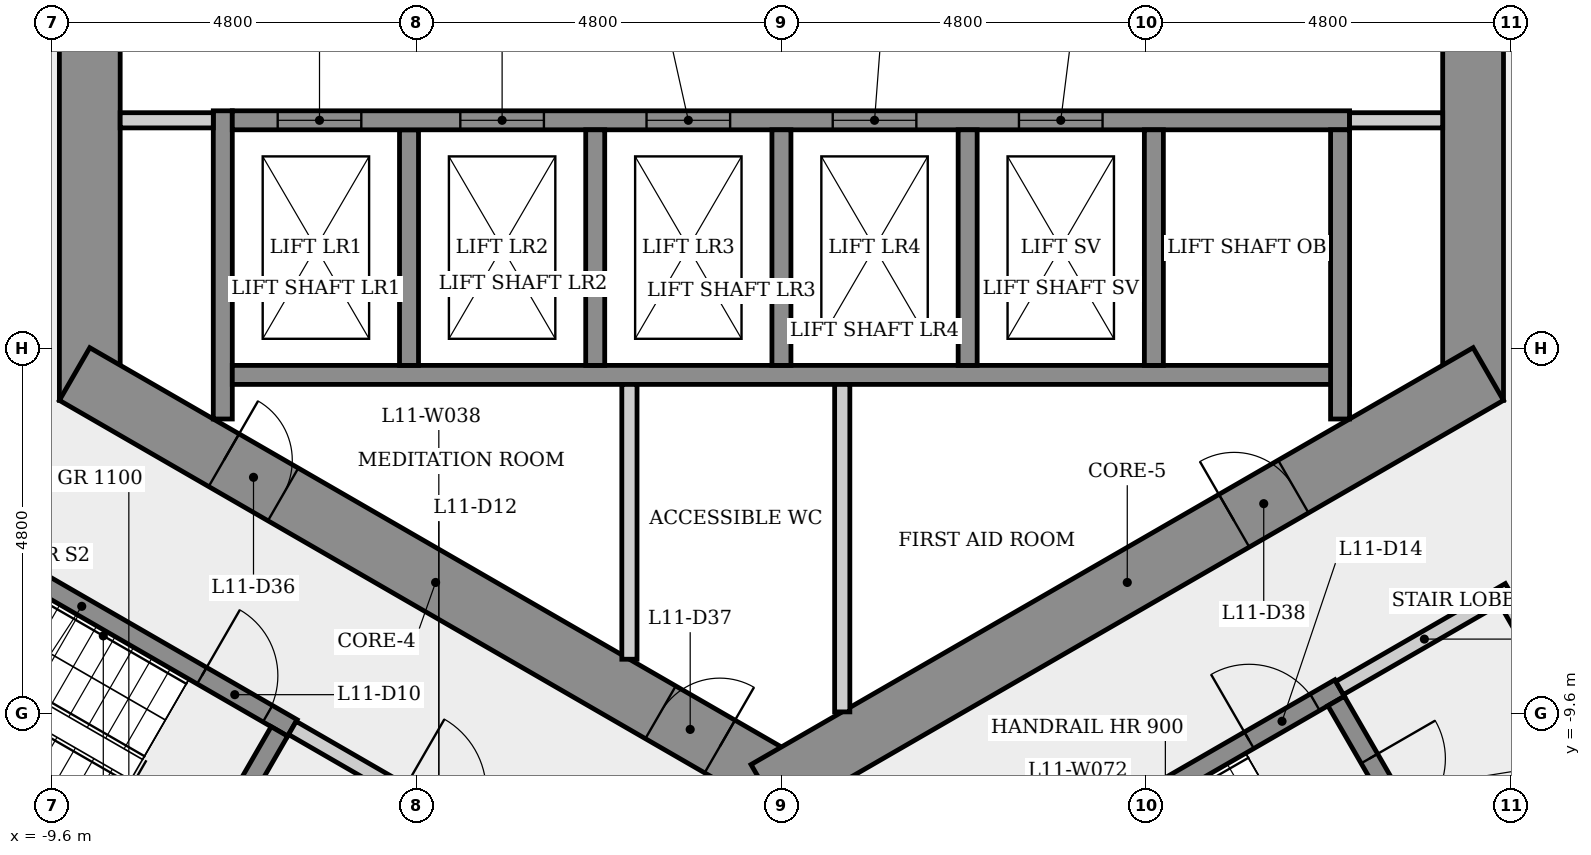
"""IFC4 building model, lengths in metres.
Left out: names, types, materials, properties, quantities, classifications, styles, units other than length and angle.
Written with IfcOpenShell. Run it as: python <this file> out.ifc"""

import sys

from ifc_helpers import new_model, si_unit, direction, frame, frame_2d, origin, place, context, subcontext, project, spatial, rectangle, extrude, element, fill, save


model = new_model("IFC4")
c1 = context("Model", 3, precision=1e-05, world=origin(), true_north=direction((0.0, 1.0)))
c2 = subcontext(c1, "Body", "Model", "MODEL_VIEW")
j1 = project(units=[si_unit("LENGTHUNIT", "METRE"), si_unit("PLANEANGLEUNIT", "RADIAN")], contexts=[c1])
p1 = place(None, origin())
s1 = spatial("IfcSite", under=j1, at=p1, CompositionType="ELEMENT")
p2 = place(p1, origin())
s2 = spatial("IfcBuilding", under=s1, at=p2, CompositionType="ELEMENT")
p3 = place(p2, frame((0.0, 0.0, 45.9)))
s3 = spatial("IfcBuildingStorey", under=s2, at=p3, CompositionType="ELEMENT", Elevation=45.9)
p4 = place(p3, frame((9.1, -5.485, 0.0), z_axis=(0.0, 0.0, 1.0), x_axis=(0.0, 1.0, 0.0)))
e1 = element("IfcWall", 1, at=p4, inside=s3, PredefinedType="SHEAR", context=c2, shape_type="SweptSolid", body=[
    extrude(rectangle(XDim=10.97, YDim=0.8, at=frame_2d((5.485, 0.0))), origin(), (0.0, 0.0, 1.0), 3.4),
])
p5 = place(p4, frame((4.685, 0.0, 0.0)))
e2 = element("IfcOpeningElement", 2, at=p5, cuts=e1, PredefinedType="OPENING", context=c2, shape_type="SweptSolid", body=[
    extrude(rectangle(XDim=1.6, YDim=2.1, at=frame_2d((0.8, 1.05))), frame((0.0, 0.41, 0.0), z_axis=(0.0, -1.0, 0.0), x_axis=(1.0, 0.0, 0.0)), (0.0, 0.0, 1.0), 0.82),
])
p6 = place(p3, frame((-9.1, 5.485, 0.0), z_axis=(0.0, 0.0, 1.0), x_axis=(0.0, -1.0, 0.0)))
e3 = element("IfcWall", 3, at=p6, inside=s3, PredefinedType="SHEAR", context=c2, shape_type="SweptSolid", body=[
    extrude(rectangle(XDim=10.97, YDim=0.8, at=frame_2d((5.485, 0.0))), origin(), (0.0, 0.0, 1.0), 3.4),
])
p7 = place(p6, frame((4.685, 0.0, 0.0)))
e4 = element("IfcOpeningElement", 4, at=p7, cuts=e3, PredefinedType="OPENING", context=c2, shape_type="SweptSolid", body=[
    extrude(rectangle(XDim=1.6, YDim=2.1, at=frame_2d((0.8, 1.05))), frame((0.0, 0.41, 0.0), z_axis=(0.0, -1.0, 0.0), x_axis=(1.0, 0.0, 0.0)), (0.0, 0.0, 1.0), 0.82),
])
p8 = place(p3, frame((-9.3, -5.138, 0.0), z_axis=(0.0, 0.0, 1.0), x_axis=(0.866023993627, -0.500002442456, 0.0)))
e5 = element("IfcWall", 5, at=p8, inside=s3, PredefinedType="SHEAR", context=c2, shape_type="SweptSolid", body=[
    extrude(rectangle(XDim=10.97, YDim=0.8, at=frame_2d((5.485, 0.0))), origin(), (0.0, 0.0, 1.0), 3.4),
])
p9 = place(p8, frame((2.268, 0.0, 0.0)))
e6 = element("IfcOpeningElement", 6, at=p9, cuts=e5, PredefinedType="OPENING", context=c2, shape_type="SweptSolid", body=[
    extrude(rectangle(XDim=0.9, YDim=2.1, at=frame_2d((0.45, 1.05))), frame((0.0, 0.41, 0.0), z_axis=(0.0, -1.0, 0.0), x_axis=(1.0, 0.0, 0.0)), (0.0, 0.0, 1.0), 0.82),
])
p10 = place(p8, frame((8.903, 0.0, 0.0)))
e7 = element("IfcOpeningElement", 7, at=p10, cuts=e5, PredefinedType="OPENING", context=c2, shape_type="SweptSolid", body=[
    extrude(rectangle(XDim=0.9, YDim=2.1, at=frame_2d((0.45, 1.05))), frame((0.0, 0.41, 0.0), z_axis=(0.0, -1.0, 0.0), x_axis=(1.0, 0.0, 0.0)), (0.0, 0.0, 1.0), 0.82),
])
p11 = place(p3, frame((-0.2, -10.623, 0.0), z_axis=(0.0, 0.0, 1.0), x_axis=(0.866023993627, 0.500002442456, 0.0)))
e8 = element("IfcWall", 8, at=p11, inside=s3, PredefinedType="SHEAR", context=c2, shape_type="SweptSolid", body=[
    extrude(rectangle(XDim=10.97, YDim=0.8, at=frame_2d((5.485, 0.0))), origin(), (0.0, 0.0, 1.0), 3.4),
])
p12 = place(p11, frame((7.108, 0.0, 0.0)))
e9 = element("IfcOpeningElement", 9, at=p12, cuts=e8, PredefinedType="OPENING", context=c2, shape_type="SweptSolid", body=[
    extrude(rectangle(XDim=0.9, YDim=2.1, at=frame_2d((0.45, 1.05))), frame((0.0, 0.41, 0.0), z_axis=(0.0, -1.0, 0.0), x_axis=(1.0, 0.0, 0.0)), (0.0, 0.0, 1.0), 0.82),
])
p13 = place(p3, frame((-11.977, -6.595, 0.0), z_axis=(0.0, 0.0, 1.0), x_axis=(0.866025499775, -0.499999833739, 0.0)))
e10 = element("IfcWall", 10, at=p13, inside=s3, PredefinedType="SHEAR", context=c2, shape_type="SweptSolid", body=[
    extrude(rectangle(XDim=6.4, YDim=0.25, at=frame_2d((3.2, 0.0))), origin(), (0.0, 0.0, 1.0), 3.05),
])
p14 = place(p13, frame((5.025, 0.0, 0.0)))
e11 = element("IfcOpeningElement", 11, at=p14, cuts=e10, PredefinedType="OPENING", context=c2, shape_type="SweptSolid", body=[
    extrude(rectangle(XDim=1.0, YDim=2.1, at=frame_2d((0.5, 1.05))), frame((0.0, 0.135, 0.0), z_axis=(0.0, -1.0, 0.0), x_axis=(1.0, 0.0, 0.0)), (0.0, 0.0, 1.0), 0.27),
])
p15 = place(p3, frame((-7.935, -12.393, 0.0), z_axis=(0.0, 0.0, 1.0), x_axis=(-0.866025499775, 0.499999833739, 0.0)))
e12 = element("IfcWall", 12, at=p15, inside=s3, PredefinedType="SHEAR", context=c2, shape_type="SweptSolid", body=[
    extrude(rectangle(XDim=6.4, YDim=0.25, at=frame_2d((3.2, 0.0))), origin(), (0.0, 0.0, 1.0), 3.05),
])
p16 = place(p3, frame((-7.35, -5.73, 0.0), z_axis=(0.0, 0.0, 1.0), x_axis=(0.0, 1.0, 0.0)))
e13 = element("IfcWall", 13, at=p16, inside=s3, PredefinedType="SHEAR", context=c2, shape_type="SweptSolid", body=[
    extrude(rectangle(XDim=4.055, YDim=0.25, at=frame_2d((2.028, 0.0))), origin(), (0.0, 0.0, 1.0), 3.05),
])
p17 = place(p3, frame((-7.475, -1.8, 0.0), z_axis=(0.0, 0.0, 1.0), x_axis=(-1.0, 0.0, 0.0)))
e14 = element("IfcWall", 14, at=p17, inside=s3, PredefinedType="PARTITIONING", context=c2, shape_type="SweptSolid", body=[
    extrude(rectangle(XDim=1.225, YDim=0.2, at=frame_2d((0.613, 0.0))), origin(), (0.0, 0.0, 1.0), 3.05),
])
p18 = place(p3, frame((-6.605, -9.841, 0.0), z_axis=(0.0, 0.0, 1.0), x_axis=(-0.499996545922, -0.866027397988, 0.0)))
e15 = element("IfcWall", 15, at=p18, inside=s3, PredefinedType="SHEAR", context=c2, shape_type="SweptSolid", body=[
    extrude(rectangle(XDim=2.75, YDim=0.25, at=frame_2d((1.375, 0.0))), origin(), (0.0, 0.0, 1.0), 3.05),
])
p19 = place(p18, frame((0.875, 0.0, 0.0)))
e16 = element("IfcOpeningElement", 16, at=p19, cuts=e15, PredefinedType="OPENING", context=c2, shape_type="SweptSolid", body=[
    extrude(rectangle(XDim=1.0, YDim=2.1, at=frame_2d((0.5, 1.05))), frame((0.0, 0.135, 0.0), z_axis=(0.0, -1.0, 0.0), x_axis=(1.0, 0.0, 0.0)), (0.0, 0.0, 1.0), 0.27),
])
p20 = place(p3, frame((-6.435, -9.795, 0.0), z_axis=(0.0, 0.0, 1.0), x_axis=(0.866012907634, -0.500021643343, 0.0)))
e17 = element("IfcWall", 17, at=p20, inside=s3, PredefinedType="PARTITIONING", context=c2, shape_type="SweptSolid", body=[
    extrude(rectangle(XDim=4.45, YDim=0.2, at=frame_2d((2.225, 0.0))), origin(), (0.0, 0.0, 1.0), 3.05),
])
p21 = place(p20, frame((1.675, 0.0, 0.0)))
e18 = element("IfcOpeningElement", 18, at=p21, cuts=e17, PredefinedType="OPENING", context=c2, shape_type="SweptSolid", body=[
    extrude(rectangle(XDim=1.1, YDim=2.1, at=frame_2d((0.55, 1.05))), frame((0.0, 0.11, 0.0), z_axis=(0.0, -1.0, 0.0), x_axis=(1.0, 0.0, 0.0)), (0.0, 0.0, 1.0), 0.22),
])
p22 = place(p3, frame((-7.225, -5.15, 0.0), z_axis=(0.0, 0.0, 1.0), x_axis=(1.0, 0.0, 0.0)))
e19 = element("IfcWall", 19, at=p22, inside=s3, PredefinedType="SHEAR", context=c2, shape_type="SweptSolid", body=[
    extrude(rectangle(XDim=14.7, YDim=0.25, at=frame_2d((7.35, 0.0))), origin(), (0.0, 0.0, 1.0), 3.05),
])
p23 = place(p3, frame((-4.9, -1.925, 0.0), z_axis=(0.0, 0.0, 1.0), x_axis=(0.0, -1.0, 0.0)))
e20 = element("IfcWall", 20, at=p23, inside=s3, PredefinedType="SHEAR", context=c2, shape_type="SweptSolid", body=[
    extrude(rectangle(XDim=3.1, YDim=0.25, at=frame_2d((1.55, 0.0))), origin(), (0.0, 0.0, 1.0), 3.4),
])
p24 = place(p3, frame((-7.225, -1.8, 0.0), z_axis=(0.0, 0.0, 1.0), x_axis=(1.0, 0.0, 0.0)))
e21 = element("IfcWall", 21, at=p24, inside=s3, PredefinedType="SHEAR", context=c2, shape_type="SweptSolid", body=[
    extrude(rectangle(XDim=14.7, YDim=0.25, at=frame_2d((7.35, 0.0))), origin(), (0.0, 0.0, 1.0), 3.05),
])
p25 = place(p24, frame((0.597, 0.0, 0.0)))
e22 = element("IfcOpeningElement", 22, at=p25, cuts=e21, PredefinedType="OPENING", context=c2, shape_type="SweptSolid", body=[
    extrude(rectangle(XDim=1.1, YDim=2.1, at=frame_2d((0.55, 1.05))), frame((0.0, 0.135, 0.0), z_axis=(0.0, -1.0, 0.0), x_axis=(1.0, 0.0, 0.0)), (0.0, 0.0, 1.0), 0.27),
])
p26 = place(p24, frame((3.0, 0.0, 0.0)))
e23 = element("IfcOpeningElement", 23, at=p26, cuts=e21, PredefinedType="OPENING", context=c2, shape_type="SweptSolid", body=[
    extrude(rectangle(XDim=1.1, YDim=2.1, at=frame_2d((0.55, 1.05))), frame((0.0, 0.135, 0.0), z_axis=(0.0, -1.0, 0.0), x_axis=(1.0, 0.0, 0.0)), (0.0, 0.0, 1.0), 0.27),
])
p27 = place(p24, frame((5.45, 0.0, 0.0)))
e24 = element("IfcOpeningElement", 24, at=p27, cuts=e21, PredefinedType="OPENING", context=c2, shape_type="SweptSolid", body=[
    extrude(rectangle(XDim=1.1, YDim=2.1, at=frame_2d((0.55, 1.05))), frame((0.0, 0.135, 0.0), z_axis=(0.0, -1.0, 0.0), x_axis=(1.0, 0.0, 0.0)), (0.0, 0.0, 1.0), 0.27),
])
p28 = place(p24, frame((7.9, 0.0, 0.0)))
e25 = element("IfcOpeningElement", 25, at=p28, cuts=e21, PredefinedType="OPENING", context=c2, shape_type="SweptSolid", body=[
    extrude(rectangle(XDim=1.1, YDim=2.1, at=frame_2d((0.55, 1.05))), frame((0.0, 0.135, 0.0), z_axis=(0.0, -1.0, 0.0), x_axis=(1.0, 0.0, 0.0)), (0.0, 0.0, 1.0), 0.27),
])
p29 = place(p24, frame((10.35, 0.0, 0.0)))
e26 = element("IfcOpeningElement", 26, at=p29, cuts=e21, PredefinedType="OPENING", context=c2, shape_type="SweptSolid", body=[
    extrude(rectangle(XDim=1.1, YDim=2.1, at=frame_2d((0.55, 1.05))), frame((0.0, 0.135, 0.0), z_axis=(0.0, -1.0, 0.0), x_axis=(1.0, 0.0, 0.0)), (0.0, 0.0, 1.0), 0.27),
])
p30 = place(p3, frame((-2.45, -1.925, 0.0), z_axis=(0.0, 0.0, 1.0), x_axis=(0.0, -1.0, 0.0)))
e27 = element("IfcWall", 27, at=p30, inside=s3, PredefinedType="SHEAR", context=c2, shape_type="SweptSolid", body=[
    extrude(rectangle(XDim=3.1, YDim=0.25, at=frame_2d((1.55, 0.0))), origin(), (0.0, 0.0, 1.0), 3.4),
])
p31 = place(p3, frame((-2.0, -5.275, 0.0), z_axis=(0.0, 0.0, 1.0), x_axis=(0.0, -1.0, 0.0)))
e28 = element("IfcWall", 28, at=p31, inside=s3, PredefinedType="PARTITIONING", context=c2, shape_type="SweptSolid", body=[
    extrude(rectangle(XDim=3.616, YDim=0.2, at=frame_2d((1.808, 0.0))), origin(), (0.0, 0.0, 1.0), 3.05),
])
p32 = place(p3, frame((0.0, -1.925, 0.0), z_axis=(0.0, 0.0, 1.0), x_axis=(0.0, -1.0, 0.0)))
e29 = element("IfcWall", 29, at=p32, inside=s3, PredefinedType="SHEAR", context=c2, shape_type="SweptSolid", body=[
    extrude(rectangle(XDim=3.1, YDim=0.25, at=frame_2d((1.55, 0.0))), origin(), (0.0, 0.0, 1.0), 3.4),
])
p33 = place(p3, frame((0.8, -5.275, 0.0), z_axis=(0.0, 0.0, 1.0), x_axis=(0.0, -1.0, 0.0)))
e30 = element("IfcWall", 30, at=p33, inside=s3, PredefinedType="PARTITIONING", context=c2, shape_type="SweptSolid", body=[
    extrude(rectangle(XDim=4.309, YDim=0.2, at=frame_2d((2.155, 0.0))), origin(), (0.0, 0.0, 1.0), 3.05),
])
p34 = place(p3, frame((1.585, -12.595, 0.0), z_axis=(0.0, 0.0, 1.0), x_axis=(0.866036417653, 0.499980922934, 0.0)))
e31 = element("IfcWall", 31, at=p34, inside=s3, PredefinedType="SHEAR", context=c2, shape_type="SweptSolid", body=[
    extrude(rectangle(XDim=6.65, YDim=0.25, at=frame_2d((3.325, 0.0))), origin(), (0.0, 0.0, 1.0), 3.05),
])
p35 = place(p34, frame((5.275, 0.0, 0.0)))
e32 = element("IfcOpeningElement", 32, at=p35, cuts=e31, PredefinedType="OPENING", context=c2, shape_type="SweptSolid", body=[
    extrude(rectangle(XDim=1.0, YDim=2.1, at=frame_2d((0.5, 1.05))), frame((0.0, 0.135, 0.0), z_axis=(0.0, -1.0, 0.0), x_axis=(1.0, 0.0, 0.0)), (0.0, 0.0, 1.0), 0.27),
])
for number, where, z_axis, x_axis in (
    (33, (2.45, -1.925, 0.0), (0.0, 0.0, 1.0), (0.0, -1.0, 0.0)),
    (34, (4.9, -1.925, 0.0), (0.0, 0.0, 1.0), (0.0, -1.0, 0.0)),
):
    element("IfcWall", number, at=place(p3, frame(where, z_axis=z_axis, x_axis=x_axis)), inside=s3, PredefinedType="SHEAR", context=c2, shape_type="SweptSolid", body=[
        extrude(rectangle(XDim=3.1, YDim=0.25, at=frame_2d((1.55, 0.0))), origin(), (0.0, 0.0, 1.0), 3.4),
    ])
p36 = place(p3, frame((7.298, -9.441, 0.0), z_axis=(0.0, 0.0, 1.0), x_axis=(0.500034990121, -0.866005201286, 0.0)))
e35 = element("IfcWall", 35, at=p36, inside=s3, PredefinedType="SHEAR", context=c2, shape_type="SweptSolid", body=[
    extrude(rectangle(XDim=2.75, YDim=0.25, at=frame_2d((1.375, 0.0))), origin(), (0.0, 0.0, 1.0), 3.05),
])
p37 = place(p36, frame((0.875, 0.0, 0.0)))
e36 = element("IfcOpeningElement", 36, at=p37, cuts=e35, PredefinedType="OPENING", context=c2, shape_type="SweptSolid", body=[
    extrude(rectangle(XDim=1.0, YDim=2.1, at=frame_2d((0.5, 1.05))), frame((0.0, 0.135, 0.0), z_axis=(0.0, -1.0, 0.0), x_axis=(1.0, 0.0, 0.0)), (0.0, 0.0, 1.0), 0.27),
])
p38 = place(p3, frame((7.344, -9.27, 0.0), z_axis=(0.0, 0.0, 1.0), x_axis=(0.866005588531, 0.500034319456, 0.0)))
e37 = element("IfcWall", 37, at=p38, inside=s3, PredefinedType="PARTITIONING", context=c2, shape_type="SweptSolid", body=[
    extrude(rectangle(XDim=2.575, YDim=0.2, at=frame_2d((1.288, 0.0))), origin(), (0.0, 0.0, 1.0), 3.05),
])
p39 = place(p3, frame((7.35, -1.925, 0.0), z_axis=(0.0, 0.0, 1.0), x_axis=(0.0, -1.0, 0.0)))
e38 = element("IfcWall", 38, at=p39, inside=s3, PredefinedType="SHEAR", context=c2, shape_type="SweptSolid", body=[
    extrude(rectangle(XDim=3.805, YDim=0.25, at=frame_2d((1.903, 0.0))), origin(), (0.0, 0.0, 1.0), 3.05),
])
p40 = place(p3, frame((8.7, -1.8, 0.0), z_axis=(0.0, 0.0, 1.0), x_axis=(-1.0, 0.0, 0.0)))
e39 = element("IfcWall", 39, at=p40, inside=s3, PredefinedType="PARTITIONING", context=c2, shape_type="SweptSolid", body=[
    extrude(rectangle(XDim=1.225, YDim=0.2, at=frame_2d((0.613, 0.0))), origin(), (0.0, 0.0, 1.0), 3.05),
])
p41 = place(p3, frame((9.537, -8.119, 0.0), z_axis=(0.0, 0.0, 1.0), x_axis=(0.499990139034, -0.866031096941, 0.0)))
e40 = element("IfcWall", 40, at=p41, inside=s3, PredefinedType="PARTITIONING", context=c2, shape_type="SweptSolid", body=[
    extrude(rectangle(XDim=3.0, YDim=0.2, at=frame_2d((1.5, 0.0))), origin(), (0.0, 0.0, 1.0), 3.05),
])
p42 = place(p41, frame((0.935, 0.0, 0.0)))
e41 = element("IfcOpeningElement", 41, at=p42, cuts=e40, PredefinedType="OPENING", context=c2, shape_type="SweptSolid", body=[
    extrude(rectangle(XDim=1.0, YDim=2.1, at=frame_2d((0.5, 1.05))), frame((0.0, 0.11, 0.0), z_axis=(0.0, -1.0, 0.0), x_axis=(1.0, 0.0, 0.0)), (0.0, 0.0, 1.0), 0.22),
])
p43 = place(p25, origin())
e42 = element("IfcDoor", 42, at=p43, inside=s3, OperationType="SLIDING_TO_LEFT", PredefinedType="DOOR", context=c2, shape_type="SweptSolid", body=[
    extrude(rectangle(XDim=1.1, YDim=2.1, at=frame_2d((0.55, 1.05))), frame((0.0, 0.025, 0.0), z_axis=(0.0, -1.0, 0.0), x_axis=(1.0, 0.0, 0.0)), (0.0, 0.0, 1.0), 0.05),
])
fill(e22, e42)
p44 = place(p26, origin())
e43 = element("IfcDoor", 43, at=p44, inside=s3, OperationType="SLIDING_TO_LEFT", PredefinedType="DOOR", context=c2, shape_type="SweptSolid", body=[
    extrude(rectangle(XDim=1.1, YDim=2.1, at=frame_2d((0.55, 1.05))), frame((0.0, 0.025, 0.0), z_axis=(0.0, -1.0, 0.0), x_axis=(1.0, 0.0, 0.0)), (0.0, 0.0, 1.0), 0.05),
])
fill(e23, e43)
p45 = place(p27, origin())
e44 = element("IfcDoor", 44, at=p45, inside=s3, OperationType="SLIDING_TO_LEFT", PredefinedType="DOOR", context=c2, shape_type="SweptSolid", body=[
    extrude(rectangle(XDim=1.1, YDim=2.1, at=frame_2d((0.55, 1.05))), frame((0.0, 0.025, 0.0), z_axis=(0.0, -1.0, 0.0), x_axis=(1.0, 0.0, 0.0)), (0.0, 0.0, 1.0), 0.05),
])
fill(e24, e44)
p46 = place(p28, origin())
e45 = element("IfcDoor", 45, at=p46, inside=s3, OperationType="SLIDING_TO_LEFT", PredefinedType="DOOR", context=c2, shape_type="SweptSolid", body=[
    extrude(rectangle(XDim=1.1, YDim=2.1, at=frame_2d((0.55, 1.05))), frame((0.0, 0.025, 0.0), z_axis=(0.0, -1.0, 0.0), x_axis=(1.0, 0.0, 0.0)), (0.0, 0.0, 1.0), 0.05),
])
fill(e25, e45)
p47 = place(p29, origin())
e46 = element("IfcDoor", 46, at=p47, inside=s3, OperationType="SLIDING_TO_LEFT", PredefinedType="DOOR", context=c2, shape_type="SweptSolid", body=[
    extrude(rectangle(XDim=1.1, YDim=2.1, at=frame_2d((0.55, 1.05))), frame((0.0, 0.025, 0.0), z_axis=(0.0, -1.0, 0.0), x_axis=(1.0, 0.0, 0.0)), (0.0, 0.0, 1.0), 0.05),
])
fill(e26, e46)
p48 = place(p14, origin())
e47 = element("IfcDoor", 47, at=p48, inside=s3, OperationType="SINGLE_SWING_LEFT", PredefinedType="DOOR", context=c2, shape_type="SweptSolid", body=[
    extrude(rectangle(XDim=1.0, YDim=2.1, at=frame_2d((0.5, 1.05))), frame((0.0, 0.025, 0.0), z_axis=(0.0, -1.0, 0.0), x_axis=(1.0, 0.0, 0.0)), (0.0, 0.0, 1.0), 0.05),
])
fill(e11, e47)
p49 = place(p35, origin())
e48 = element("IfcDoor", 48, at=p49, inside=s3, OperationType="SINGLE_SWING_LEFT", PredefinedType="DOOR", context=c2, shape_type="SweptSolid", body=[
    extrude(rectangle(XDim=1.0, YDim=2.1, at=frame_2d((0.5, 1.05))), frame((0.0, 0.025, 0.0), z_axis=(0.0, -1.0, 0.0), x_axis=(1.0, 0.0, 0.0)), (0.0, 0.0, 1.0), 0.05),
])
fill(e32, e48)
p50 = place(p37, origin())
e49 = element("IfcDoor", 49, at=p50, inside=s3, OperationType="SINGLE_SWING_LEFT", PredefinedType="DOOR", context=c2, shape_type="SweptSolid", body=[
    extrude(rectangle(XDim=1.0, YDim=2.1, at=frame_2d((0.5, 1.05))), frame((0.0, 0.025, 0.0), z_axis=(0.0, -1.0, 0.0), x_axis=(1.0, 0.0, 0.0)), (0.0, 0.0, 1.0), 0.05),
])
fill(e36, e49)
p51 = place(p9, origin())
e50 = element("IfcDoor", 50, at=p51, inside=s3, OperationType="SINGLE_SWING_LEFT", PredefinedType="DOOR", context=c2, shape_type="SweptSolid", body=[
    extrude(rectangle(XDim=0.9, YDim=2.1, at=frame_2d((0.45, 1.05))), frame((0.0, 0.025, 0.0), z_axis=(0.0, -1.0, 0.0), x_axis=(1.0, 0.0, 0.0)), (0.0, 0.0, 1.0), 0.05),
])
fill(e6, e50)
p52 = place(p10, origin())
e51 = element("IfcDoor", 51, at=p52, inside=s3, OperationType="SINGLE_SWING_RIGHT", PredefinedType="DOOR", context=c2, shape_type="SweptSolid", body=[
    extrude(rectangle(XDim=0.9, YDim=2.1, at=frame_2d((0.45, 1.05))), frame((0.0, 0.025, 0.0), z_axis=(0.0, -1.0, 0.0), x_axis=(1.0, 0.0, 0.0)), (0.0, 0.0, 1.0), 0.05),
])
fill(e7, e51)
p53 = place(p12, origin())
e52 = element("IfcDoor", 52, at=p53, inside=s3, OperationType="SINGLE_SWING_LEFT", PredefinedType="DOOR", context=c2, shape_type="SweptSolid", body=[
    extrude(rectangle(XDim=0.9, YDim=2.1, at=frame_2d((0.45, 1.05))), frame((0.0, 0.025, 0.0), z_axis=(0.0, -1.0, 0.0), x_axis=(1.0, 0.0, 0.0)), (0.0, 0.0, 1.0), 0.05),
])
fill(e9, e52)
save(model, sys.argv[1])
